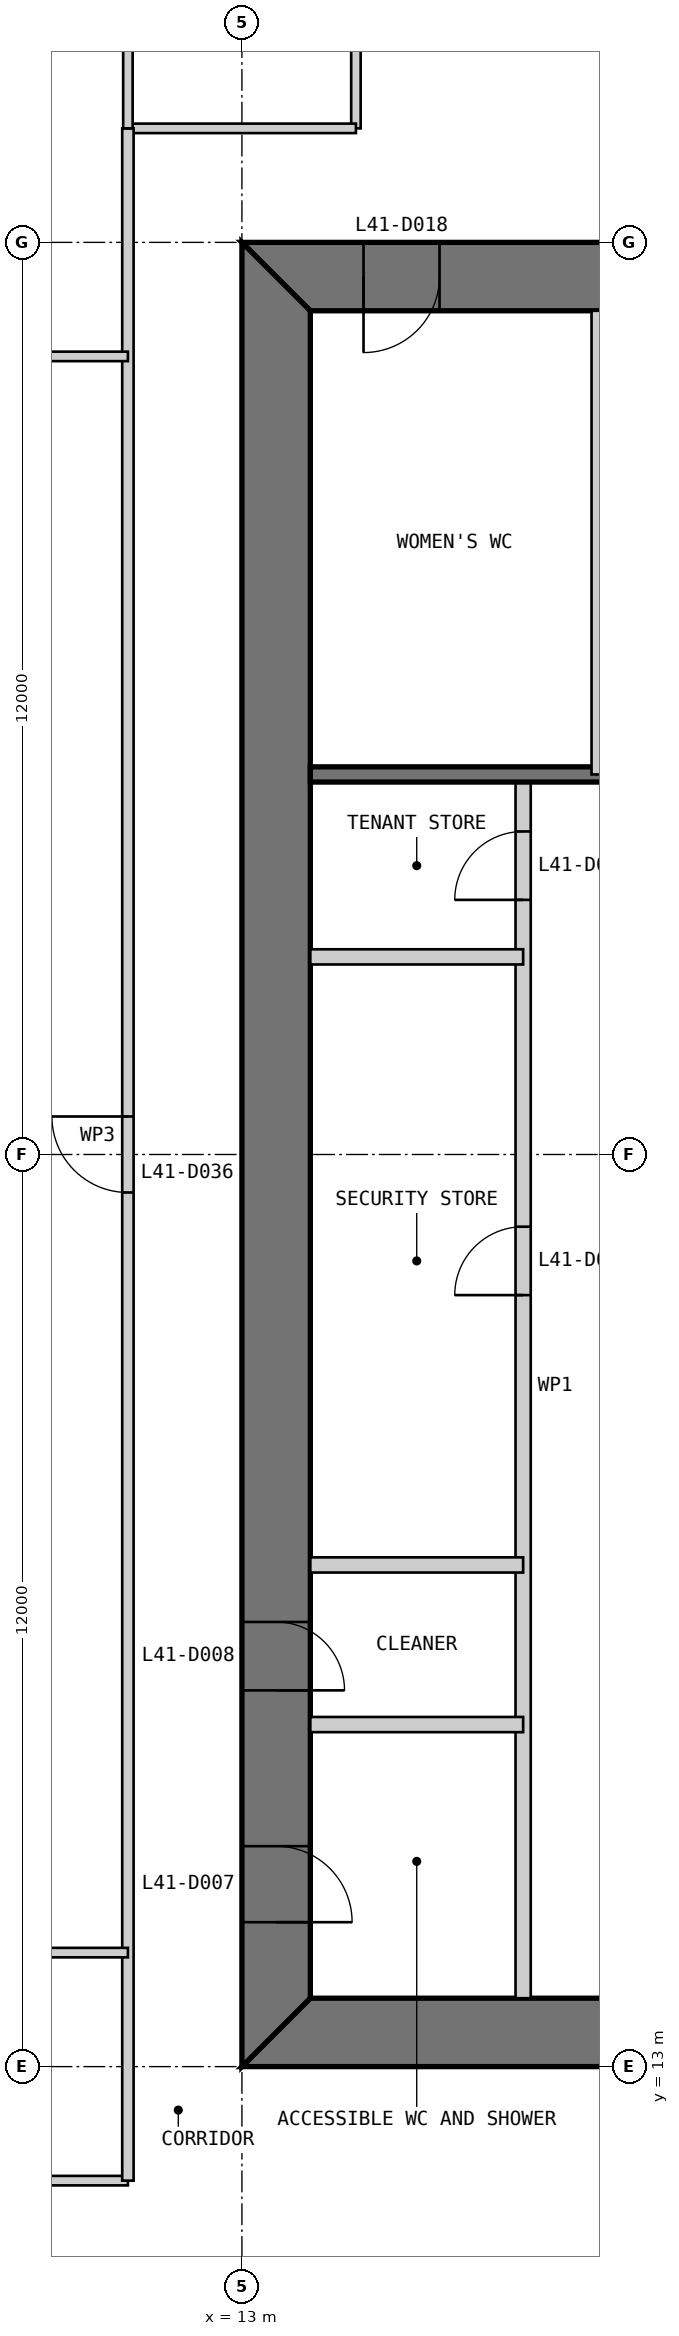
"""IFC4 building model, lengths in metres.
Left out: names, types, materials, properties, quantities, classifications, styles, units other than length and angle.
Written with IfcOpenShell. Run it as: python <this file> out.ifc"""

import sys

from ifc_helpers import new_model, si_unit, direction, frame, frame_2d, origin, place, context, subcontext, project, spatial, polyline, rectangle, outline, extrude, element, fill, save


model = new_model("IFC4")
c1 = context("Model", 3, precision=1e-05, world=origin(), true_north=direction((0.0, 1.0)))
c2 = subcontext(c1, "Body", "Model", "MODEL_VIEW")
j1 = project(units=[si_unit("LENGTHUNIT", "METRE"), si_unit("PLANEANGLEUNIT", "RADIAN")], contexts=[c1])
p1 = place(None, origin())
s1 = spatial("IfcSite", under=j1, at=p1, CompositionType="ELEMENT")
p2 = place(p1, origin())
s2 = spatial("IfcBuilding", under=s1, at=p2, CompositionType="ELEMENT")
p3 = place(p2, frame((0.0, 0.0, 177.8)))
s3 = spatial("IfcBuildingStorey", under=s2, at=p3, CompositionType="ELEMENT", Elevation=177.8)
p4 = place(p3, frame((13.0, 13.45, 0.0), z_axis=(0.0, 0.0, 1.0), x_axis=(1.0, 0.0, 0.0)))
e1 = element("IfcWall", 1, at=p4, inside=s3, PredefinedType="SHEAR", context=c2, shape_type="SweptSolid", body=[
    extrude(outline(polyline([(0.0, -0.45), (24.0, -0.45), (23.1, 0.45), (0.9, 0.45), (0.0, -0.45)])), origin(), (0.0, 0.0, 1.0), 4.0),
])
p5 = place(p4, frame((4.9, 0.0, 0.0)))
e2 = element("IfcOpeningElement", 2, at=p5, cuts=e1, PredefinedType="OPENING", context=c2, shape_type="SweptSolid", body=[
    extrude(rectangle(XDim=1.0, YDim=2.2, at=frame_2d((0.5, 1.1))), frame((0.0, 0.46, 0.0), z_axis=(0.0, -1.0, 0.0), x_axis=(1.0, 0.0, 0.0)), (0.0, 0.0, 1.0), 0.92),
])
p6 = place(p4, frame((8.9, 0.0, 0.0)))
e3 = element("IfcOpeningElement", 3, at=p6, cuts=e1, PredefinedType="OPENING", context=c2, shape_type="SweptSolid", body=[
    extrude(rectangle(XDim=1.1, YDim=2.2, at=frame_2d((0.55, 1.1))), frame((0.0, 0.46, 0.0), z_axis=(0.0, -1.0, 0.0), x_axis=(1.0, 0.0, 0.0)), (0.0, 0.0, 1.0), 0.92),
])
p7 = place(p4, frame((15.05, 0.0, 0.0)))
e4 = element("IfcOpeningElement", 4, at=p7, cuts=e1, PredefinedType="OPENING", context=c2, shape_type="SweptSolid", body=[
    extrude(rectangle(XDim=0.9, YDim=2.2, at=frame_2d((0.45, 1.1))), frame((0.0, 0.46, 0.0), z_axis=(0.0, -1.0, 0.0), x_axis=(1.0, 0.0, 0.0)), (0.0, 0.0, 1.0), 0.92),
])
p8 = place(p4, frame((17.9, 0.0, 0.0)))
e5 = element("IfcOpeningElement", 5, at=p8, cuts=e1, PredefinedType="OPENING", context=c2, shape_type="SweptSolid", body=[
    extrude(rectangle(XDim=1.0, YDim=2.2, at=frame_2d((0.5, 1.1))), frame((0.0, 0.46, 0.0), z_axis=(0.0, -1.0, 0.0), x_axis=(1.0, 0.0, 0.0)), (0.0, 0.0, 1.0), 0.92),
])
p9 = place(p4, frame((21.4, 0.0, 0.0)))
e6 = element("IfcOpeningElement", 6, at=p9, cuts=e1, PredefinedType="OPENING", context=c2, shape_type="SweptSolid", body=[
    extrude(rectangle(XDim=1.0, YDim=2.2, at=frame_2d((0.5, 1.1))), frame((0.0, 0.46, 0.0), z_axis=(0.0, -1.0, 0.0), x_axis=(1.0, 0.0, 0.0)), (0.0, 0.0, 1.0), 0.92),
])
p10 = place(p3, frame((37.0, 36.55, 0.0), z_axis=(0.0, 0.0, 1.0), x_axis=(-1.0, 0.0, 0.0)))
e7 = element("IfcWall", 7, at=p10, inside=s3, PredefinedType="SHEAR", context=c2, shape_type="SweptSolid", body=[
    extrude(outline(polyline([(0.0, -0.45), (24.0, -0.45), (23.1, 0.45), (0.9, 0.45), (0.0, -0.45)])), origin(), (0.0, 0.0, 1.0), 4.0),
])
p11 = place(p10, frame((4.9, 0.0, 0.0)))
e8 = element("IfcOpeningElement", 8, at=p11, cuts=e7, PredefinedType="OPENING", context=c2, shape_type="SweptSolid", body=[
    extrude(rectangle(XDim=1.0, YDim=2.2, at=frame_2d((0.5, 1.1))), frame((0.0, 0.46, 0.0), z_axis=(0.0, -1.0, 0.0), x_axis=(1.0, 0.0, 0.0)), (0.0, 0.0, 1.0), 0.92),
])
p12 = place(p10, frame((8.9, 0.0, 0.0)))
e9 = element("IfcOpeningElement", 9, at=p12, cuts=e7, PredefinedType="OPENING", context=c2, shape_type="SweptSolid", body=[
    extrude(rectangle(XDim=1.1, YDim=2.2, at=frame_2d((0.55, 1.1))), frame((0.0, 0.46, 0.0), z_axis=(0.0, -1.0, 0.0), x_axis=(1.0, 0.0, 0.0)), (0.0, 0.0, 1.0), 0.92),
])
p13 = place(p10, frame((15.05, 0.0, 0.0)))
e10 = element("IfcOpeningElement", 10, at=p13, cuts=e7, PredefinedType="OPENING", context=c2, shape_type="SweptSolid", body=[
    extrude(rectangle(XDim=0.9, YDim=2.2, at=frame_2d((0.45, 1.1))), frame((0.0, 0.46, 0.0), z_axis=(0.0, -1.0, 0.0), x_axis=(1.0, 0.0, 0.0)), (0.0, 0.0, 1.0), 0.92),
])
p14 = place(p10, frame((17.9, 0.0, 0.0)))
e11 = element("IfcOpeningElement", 11, at=p14, cuts=e7, PredefinedType="OPENING", context=c2, shape_type="SweptSolid", body=[
    extrude(rectangle(XDim=1.0, YDim=2.2, at=frame_2d((0.5, 1.1))), frame((0.0, 0.46, 0.0), z_axis=(0.0, -1.0, 0.0), x_axis=(1.0, 0.0, 0.0)), (0.0, 0.0, 1.0), 0.92),
])
p15 = place(p10, frame((21.4, 0.0, 0.0)))
e12 = element("IfcOpeningElement", 12, at=p15, cuts=e7, PredefinedType="OPENING", context=c2, shape_type="SweptSolid", body=[
    extrude(rectangle(XDim=1.0, YDim=2.2, at=frame_2d((0.5, 1.1))), frame((0.0, 0.46, 0.0), z_axis=(0.0, -1.0, 0.0), x_axis=(1.0, 0.0, 0.0)), (0.0, 0.0, 1.0), 0.92),
])
p16 = place(p3, frame((13.45, 36.1, 0.0), z_axis=(0.0, 0.0, 1.0), x_axis=(0.0, -1.0, 0.0)))
e13 = element("IfcWall", 13, at=p16, inside=s3, PredefinedType="SHEAR", context=c2, shape_type="SweptSolid", body=[
    extrude(outline(polyline([(-0.9, -0.45), (23.1, -0.45), (22.2, 0.45), (0.0, 0.45), (-0.9, -0.45)])), origin(), (0.0, 0.0, 1.0), 4.0),
])
p17 = place(p16, frame((20.2, 0.0, 0.0)))
e14 = element("IfcOpeningElement", 14, at=p17, cuts=e13, PredefinedType="OPENING", context=c2, shape_type="SweptSolid", body=[
    extrude(rectangle(XDim=1.0, YDim=2.2, at=frame_2d((0.5, 1.1))), frame((0.0, 0.46, 0.0), z_axis=(0.0, -1.0, 0.0), x_axis=(1.0, 0.0, 0.0)), (0.0, 0.0, 1.0), 0.92),
])
p18 = place(p16, frame((17.25, 0.0, 0.0)))
e15 = element("IfcOpeningElement", 15, at=p18, cuts=e13, PredefinedType="OPENING", context=c2, shape_type="SweptSolid", body=[
    extrude(rectangle(XDim=0.9, YDim=2.2, at=frame_2d((0.45, 1.1))), frame((0.0, 0.46, 0.0), z_axis=(0.0, -1.0, 0.0), x_axis=(1.0, 0.0, 0.0)), (0.0, 0.0, 1.0), 0.92),
])
p19 = place(p3, frame((16.7, 13.9, 0.0), z_axis=(0.0, 0.0, 1.0), x_axis=(0.0, 1.0, 0.0)))
e16 = element("IfcWall", 16, at=p19, inside=s3, PredefinedType="PARTITIONING", context=c2, shape_type="SweptSolid", body=[
    extrude(rectangle(XDim=16.1, YDim=0.2, at=frame_2d((8.05, 0.0))), origin(), (0.0, 0.0, 1.0), 3.8),
])
p20 = place(p19, frame((9.25, 0.0, 0.0)))
e17 = element("IfcOpeningElement", 17, at=p20, cuts=e16, PredefinedType="OPENING", context=c2, shape_type="SweptSolid", body=[
    extrude(rectangle(XDim=0.9, YDim=2.2, at=frame_2d((0.45, 1.1))), frame((0.0, 0.11, 0.0), z_axis=(0.0, -1.0, 0.0), x_axis=(1.0, 0.0, 0.0)), (0.0, 0.0, 1.0), 0.22),
])
p21 = place(p19, frame((14.45, 0.0, 0.0)))
e18 = element("IfcOpeningElement", 18, at=p21, cuts=e16, PredefinedType="OPENING", context=c2, shape_type="SweptSolid", body=[
    extrude(rectangle(XDim=0.9, YDim=2.2, at=frame_2d((0.45, 1.1))), frame((0.0, 0.11, 0.0), z_axis=(0.0, -1.0, 0.0), x_axis=(1.0, 0.0, 0.0)), (0.0, 0.0, 1.0), 0.22),
])
for number, where, z_axis, x_axis in (
    (19, (13.9, 17.5, 0.0), (0.0, 0.0, 1.0), (1.0, 0.0, 0.0)),
    (20, (13.9, 19.6, 0.0), (0.0, 0.0, 1.0), (1.0, 0.0, 0.0)),
    (21, (13.9, 27.6, 0.0), (0.0, 0.0, 1.0), (1.0, 0.0, 0.0)),
):
    element("IfcWall", number, at=place(p3, frame(where, z_axis=z_axis, x_axis=x_axis)), inside=s3, PredefinedType="PARTITIONING", context=c2, shape_type="SweptSolid", body=[
        extrude(rectangle(XDim=2.8, YDim=0.2, at=frame_2d((1.4, 0.0))), origin(), (0.0, 0.0, 1.0), 3.8),
    ])
p22 = place(p3, frame((29.7, 30.0, 0.0), z_axis=(0.0, 0.0, 1.0), x_axis=(-1.0, 0.0, 0.0)))
e22 = element("IfcWall", 22, at=p22, inside=s3, PredefinedType="SOLIDWALL", context=c2, shape_type="SweptSolid", body=[
    extrude(rectangle(XDim=15.8, YDim=0.2, at=frame_2d((7.9, 0.0))), origin(), (0.0, 0.0, 1.0), 3.8),
])
p23 = place(p3, frame((17.7, 36.1, 0.0), z_axis=(0.0, 0.0, 1.0), x_axis=(0.0, -1.0, 0.0)))
e23 = element("IfcWall", 23, at=p23, inside=s3, PredefinedType="PARTITIONING", context=c2, shape_type="SweptSolid", body=[
    extrude(rectangle(XDim=6.1, YDim=0.2, at=frame_2d((3.05, 0.0))), origin(), (0.0, 0.0, 1.0), 3.8),
])
p24 = place(p3, frame((0.15, 11.5, 0.0), z_axis=(0.0, 0.0, 1.0), x_axis=(1.0, 0.0, 0.0)))
e24 = element("IfcWall", 24, at=p24, inside=s3, PredefinedType="PARTITIONING", context=c2, shape_type="SweptSolid", body=[
    extrude(rectangle(XDim=11.35, YDim=0.125, at=frame_2d((5.675, 0.0))), origin(), (0.0, 0.0, 1.0), 3.85),
])
p25 = place(p3, frame((14.5, 46.0, 0.0), z_axis=(0.0, 0.0, 1.0), x_axis=(0.0, -1.0, 0.0)))
e25 = element("IfcWall", 25, at=p25, inside=s3, PredefinedType="PARTITIONING", context=c2, shape_type="SweptSolid", body=[
    extrude(rectangle(XDim=7.5, YDim=0.125, at=frame_2d((3.75, 0.0))), origin(), (0.0, 0.0, 1.0), 3.85),
])
p26 = place(p25, frame((3.3, 0.0, 0.0)))
e26 = element("IfcOpeningElement", 26, at=p26, cuts=e25, PredefinedType="OPENING", context=c2, shape_type="SweptSolid", body=[
    extrude(rectangle(XDim=0.9, YDim=2.2, at=frame_2d((0.45, 1.1))), frame((0.0, 0.073, 0.0), z_axis=(0.0, -1.0, 0.0), x_axis=(1.0, 0.0, 0.0)), (0.0, 0.0, 1.0), 0.145),
])
p27 = place(p3, frame((14.5, 38.5, 0.0), z_axis=(0.0, 0.0, 1.0), x_axis=(-1.0, 0.0, 0.0)))
e27 = element("IfcWall", 27, at=p27, inside=s3, PredefinedType="PARTITIONING", context=c2, shape_type="SweptSolid", body=[
    extrude(rectangle(XDim=3.0, YDim=0.125, at=frame_2d((1.5, 0.0))), origin(), (0.0, 0.0, 1.0), 3.85),
])
p28 = place(p3, frame((11.5, 38.5, 0.0), z_axis=(0.0, 0.0, 1.0), x_axis=(0.0, -1.0, 0.0)))
e28 = element("IfcWall", 28, at=p28, inside=s3, PredefinedType="PARTITIONING", context=c2, shape_type="SweptSolid", body=[
    extrude(rectangle(XDim=27.0, YDim=0.15, at=frame_2d((13.5, 0.0))), origin(), (0.0, 0.0, 1.0), 3.85),
])
p29 = place(p28, frame((13.0, 0.0, 0.0)))
e29 = element("IfcOpeningElement", 29, at=p29, cuts=e28, PredefinedType="OPENING", context=c2, shape_type="SweptSolid", body=[
    extrude(rectangle(XDim=1.0, YDim=2.2, at=frame_2d((0.5, 1.1))), frame((0.0, 0.085, 0.0), z_axis=(0.0, -1.0, 0.0), x_axis=(1.0, 0.0, 0.0)), (0.0, 0.0, 1.0), 0.17),
])
p30 = place(p3, frame((11.5, 49.85, 0.0), z_axis=(0.0, 0.0, 1.0), x_axis=(0.0, -1.0, 0.0)))
e30 = element("IfcWall", 30, at=p30, inside=s3, PredefinedType="PARTITIONING", context=c2, shape_type="SweptSolid", body=[
    extrude(rectangle(XDim=11.35, YDim=0.125, at=frame_2d((5.675, 0.0))), origin(), (0.0, 0.0, 1.0), 3.85),
])
p31 = place(p3, frame((0.15, 35.5, 0.0), z_axis=(0.0, 0.0, 1.0), x_axis=(1.0, 0.0, 0.0)))
e31 = element("IfcWall", 31, at=p31, inside=s3, PredefinedType="PARTITIONING", context=c2, shape_type="SweptSolid", body=[
    extrude(rectangle(XDim=11.35, YDim=0.125, at=frame_2d((5.675, 0.0))), origin(), (0.0, 0.0, 1.0), 3.85),
])
p32 = place(p31, frame((7.1, 0.0, 0.0)))
e32 = element("IfcOpeningElement", 32, at=p32, cuts=e31, PredefinedType="OPENING", context=c2, shape_type="SweptSolid", body=[
    extrude(rectangle(XDim=1.0, YDim=2.2, at=frame_2d((0.5, 1.1))), frame((0.0, 0.073, 0.0), z_axis=(0.0, -1.0, 0.0), x_axis=(1.0, 0.0, 0.0)), (0.0, 0.0, 1.0), 0.145),
])
p33 = place(p3, frame((4.0, 14.5, 0.0), z_axis=(0.0, 0.0, 1.0), x_axis=(1.0, 0.0, 0.0)))
e33 = element("IfcWall", 33, at=p33, inside=s3, PredefinedType="PARTITIONING", context=c2, shape_type="SweptSolid", body=[
    extrude(rectangle(XDim=7.5, YDim=0.125, at=frame_2d((3.75, 0.0))), origin(), (0.0, 0.0, 1.0), 3.85),
])
p34 = place(p33, frame((3.3, 0.0, 0.0)))
e34 = element("IfcOpeningElement", 34, at=p34, cuts=e33, PredefinedType="OPENING", context=c2, shape_type="SweptSolid", body=[
    extrude(rectangle(XDim=0.9, YDim=2.2, at=frame_2d((0.45, 1.1))), frame((0.0, 0.073, 0.0), z_axis=(0.0, -1.0, 0.0), x_axis=(1.0, 0.0, 0.0)), (0.0, 0.0, 1.0), 0.145),
])
p35 = place(p17, origin())
e35 = element("IfcDoor", 35, at=p35, inside=s3, OperationType="SINGLE_SWING_RIGHT", PredefinedType="DOOR", context=c2, shape_type="SweptSolid", body=[
    extrude(rectangle(XDim=1.0, YDim=2.2, at=frame_2d((0.5, 1.1))), frame((0.0, 0.025, 0.0), z_axis=(0.0, -1.0, 0.0), x_axis=(1.0, 0.0, 0.0)), (0.0, 0.0, 1.0), 0.05),
    extrude(outline(polyline([(0.0, 0.0), (0.04, 0.0), (0.04, 2.16), (0.96, 2.16), (0.96, 0.0), (1.0, 0.0), (1.0, 2.2), (0.0, 2.2), (0.0, 0.0)])), frame((0.0, 0.3, 0.0), z_axis=(0.0, -1.0, 0.0), x_axis=(1.0, 0.0, 0.0)), (0.0, 0.0, 1.0), 0.6),
])
fill(e14, e35)
p36 = place(p18, origin())
e36 = element("IfcDoor", 36, at=p36, inside=s3, OperationType="SINGLE_SWING_RIGHT", PredefinedType="DOOR", context=c2, shape_type="SweptSolid", body=[
    extrude(rectangle(XDim=0.9, YDim=2.2, at=frame_2d((0.45, 1.1))), frame((0.0, 0.025, 0.0), z_axis=(0.0, -1.0, 0.0), x_axis=(1.0, 0.0, 0.0)), (0.0, 0.0, 1.0), 0.05),
    extrude(outline(polyline([(0.0, 0.0), (0.04, 0.0), (0.04, 2.16), (0.86, 2.16), (0.86, 0.0), (0.9, 0.0), (0.9, 2.2), (0.0, 2.2), (0.0, 0.0)])), frame((0.0, 0.3, 0.0), z_axis=(0.0, -1.0, 0.0), x_axis=(1.0, 0.0, 0.0)), (0.0, 0.0, 1.0), 0.6),
])
fill(e15, e36)
p37 = place(p20, origin())
e37 = element("IfcDoor", 37, at=p37, inside=s3, OperationType="SINGLE_SWING_LEFT", PredefinedType="DOOR", context=c2, shape_type="SweptSolid", body=[
    extrude(rectangle(XDim=0.9, YDim=2.2, at=frame_2d((0.45, 1.1))), frame((0.0, 0.025, 0.0), z_axis=(0.0, -1.0, 0.0), x_axis=(1.0, 0.0, 0.0)), (0.0, 0.0, 1.0), 0.05),
])
fill(e17, e37)
p38 = place(p21, origin())
e38 = element("IfcDoor", 38, at=p38, inside=s3, OperationType="SINGLE_SWING_LEFT", PredefinedType="DOOR", context=c2, shape_type="SweptSolid", body=[
    extrude(rectangle(XDim=0.9, YDim=2.2, at=frame_2d((0.45, 1.1))), frame((0.0, 0.025, 0.0), z_axis=(0.0, -1.0, 0.0), x_axis=(1.0, 0.0, 0.0)), (0.0, 0.0, 1.0), 0.05),
])
fill(e18, e38)
p39 = place(p15, origin())
e39 = element("IfcDoor", 39, at=p39, inside=s3, OperationType="SINGLE_SWING_RIGHT", PredefinedType="DOOR", context=c2, shape_type="SweptSolid", body=[
    extrude(rectangle(XDim=1.0, YDim=2.2, at=frame_2d((0.5, 1.1))), frame((0.0, 0.025, 0.0), z_axis=(0.0, -1.0, 0.0), x_axis=(1.0, 0.0, 0.0)), (0.0, 0.0, 1.0), 0.05),
    extrude(outline(polyline([(0.0, 0.0), (0.04, 0.0), (0.04, 2.16), (0.96, 2.16), (0.96, 0.0), (1.0, 0.0), (1.0, 2.2), (0.0, 2.2), (0.0, 0.0)])), frame((0.0, 0.3, 0.0), z_axis=(0.0, -1.0, 0.0), x_axis=(1.0, 0.0, 0.0)), (0.0, 0.0, 1.0), 0.6),
])
fill(e12, e39)
p40 = place(p29, frame((1.0, 0.0, 0.0), z_axis=(0.0, 0.0, 1.0), x_axis=(-1.0, 0.0, 0.0)))
e40 = element("IfcDoor", 40, at=p40, inside=s3, OperationType="SINGLE_SWING_RIGHT", PredefinedType="DOOR", context=c2, shape_type="SweptSolid", body=[
    extrude(rectangle(XDim=1.0, YDim=2.2, at=frame_2d((0.5, 1.1))), frame((0.0, 0.025, 0.0), z_axis=(0.0, -1.0, 0.0), x_axis=(1.0, 0.0, 0.0)), (0.0, 0.0, 1.0), 0.05),
])
fill(e29, e40)
save(model, sys.argv[1])
